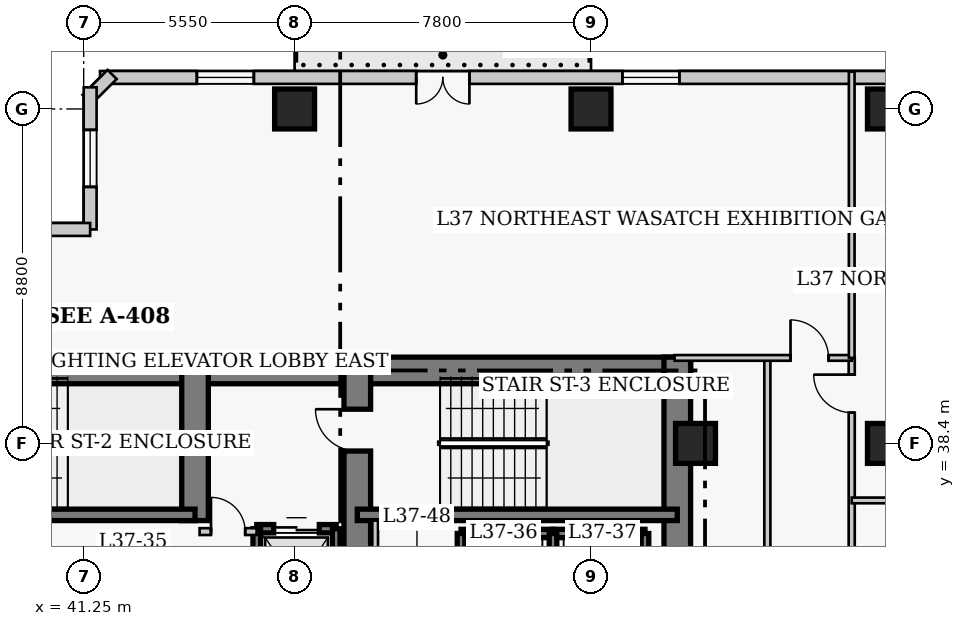
"""IFC4 building model, lengths in metres.
Left out: names, types, materials, properties, quantities, classifications, styles, units other than length and angle.
Written with IfcOpenShell. Run it as: python <this file> out.ifc"""

import sys

from ifc_helpers import new_model, si_unit, direction, frame, frame_2d, origin, origin_2d, place, context, subcontext, project, spatial, rectangle, extrude, element, fill, save


model = new_model("IFC4")
c1 = context("Model", 3, precision=1e-05, world=origin(), true_north=direction((0.0, 1.0)))
c2 = subcontext(c1, "Body", "Model", "MODEL_VIEW")
j1 = project(units=[si_unit("LENGTHUNIT", "METRE"), si_unit("PLANEANGLEUNIT", "RADIAN")], contexts=[c1])
p1 = place(None, origin())
s1 = spatial("IfcSite", under=j1, at=p1, CompositionType="ELEMENT")
p2 = place(p1, origin())
s2 = spatial("IfcBuilding", under=s1, at=p2, CompositionType="ELEMENT")
p3 = place(p2, frame((0.0, 0.0, 149.8)))
s3 = spatial("IfcBuildingStorey", under=s2, at=p3, CompositionType="ELEMENT", Elevation=149.8)
p4 = place(p3, frame((35.85, 40.32, 0.0), z_axis=(0.0, 0.0, 1.0), x_axis=(1.0, 0.0, 0.0)))
e1 = element("IfcWall", 1, at=p4, inside=s3, PredefinedType="SHEAR", context=c2, shape_type="SweptSolid", body=[
    extrude(rectangle(XDim=12.6, YDim=0.7, at=frame_2d((6.3, 0.0))), origin(), (0.0, 0.0, 1.0), 3.8),
])
p5 = place(p3, frame((48.45, 40.32, 0.0), z_axis=(0.0, 0.0, 1.0), x_axis=(1.0, 0.0, 0.0)))
e2 = element("IfcWall", 2, at=p5, inside=s3, PredefinedType="SHEAR", context=c2, shape_type="SweptSolid", body=[
    extrude(rectangle(XDim=8.77, YDim=0.7, at=frame_2d((4.385, 0.0))), origin(), (0.0, 0.0, 1.0), 3.8),
])
p6 = place(p3, frame((56.87, 27.05, 0.0), z_axis=(0.0, 0.0, 1.0), x_axis=(0.0, 1.0, 0.0)))
e3 = element("IfcWall", 3, at=p6, inside=s3, PredefinedType="SHEAR", context=c2, shape_type="SweptSolid", body=[
    extrude(rectangle(XDim=13.62, YDim=0.7, at=frame_2d((6.81, 0.0))), origin(), (0.0, 0.0, 1.0), 3.8),
])
p7 = place(p3, frame((44.18, 36.37, 0.0), z_axis=(0.0, 0.0, 1.0), x_axis=(0.0, 1.0, 0.0)))
e4 = element("IfcWall", 4, at=p7, inside=s3, PredefinedType="SHEAR", context=c2, shape_type="SweptSolid", body=[
    extrude(rectangle(XDim=3.95, YDim=0.7, at=frame_2d((1.975, 0.0))), origin(), (0.0, 0.0, 1.0), 3.8),
])
p8 = place(p3, frame((48.45, 32.4, 0.0), z_axis=(0.0, 0.0, 1.0), x_axis=(0.0, 1.0, 0.0)))
e5 = element("IfcWall", 5, at=p8, inside=s3, PredefinedType="SHEAR", context=c2, shape_type="SweptSolid", body=[
    extrude(rectangle(XDim=7.92, YDim=0.7, at=frame_2d((3.96, 0.0))), origin(), (0.0, 0.0, 1.0), 3.8),
])
p9 = place(p8, frame((5.8, 0.0, 0.0)))
e6 = element("IfcOpeningElement", 6, at=p9, cuts=e5, PredefinedType="OPENING", context=c2, shape_type="SweptSolid", body=[
    extrude(rectangle(XDim=1.1, YDim=2.15, at=frame_2d((0.55, 1.075))), frame((0.0, 0.36, 0.0), z_axis=(0.0, -1.0, 0.0), x_axis=(1.0, 0.0, 0.0)), (0.0, 0.0, 1.0), 0.72),
])
p10 = place(p3, frame((35.85, 36.52, 0.0), z_axis=(0.0, 0.0, 1.0), x_axis=(1.0, 0.0, 0.0)))
e7 = element("IfcWall", 7, at=p10, inside=s3, PredefinedType="SHEAR", context=c2, shape_type="SweptSolid", body=[
    extrude(rectangle(XDim=8.33, YDim=0.3, at=frame_2d((4.165, 0.0))), origin(), (0.0, 0.0, 1.0), 3.8),
])
p11 = place(p3, frame((48.45, 36.52, 0.0), z_axis=(0.0, 0.0, 1.0), x_axis=(1.0, 0.0, 0.0)))
e8 = element("IfcWall", 8, at=p11, inside=s3, PredefinedType="SHEAR", context=c2, shape_type="SweptSolid", body=[
    extrude(rectangle(XDim=8.42, YDim=0.3, at=frame_2d((4.21, 0.0))), origin(), (0.0, 0.0, 1.0), 3.8),
])
for number, where, z_axis, x_axis in (
    (9, (46.8, 47.2, 0.0), (0.0, 0.0, 1.0), (1.0, 0.0, 0.0)),
    (10, (54.6, 47.2, 0.0), (0.0, 0.0, 1.0), (1.0, 0.0, 0.0)),
    (11, (62.4, 38.4, 0.0), (0.0, 0.0, 1.0), (1.0, 0.0, 0.0)),
    (12, (62.4, 47.2, 0.0), (0.0, 0.0, 1.0), (1.0, 0.0, 0.0)),
    (13, (57.35, 38.4, 0.0), (0.0, 0.0, 1.0), (1.0, 0.0, 0.0)),
):
    element("IfcColumn", number, at=place(p3, frame(where, z_axis=z_axis, x_axis=x_axis)), inside=s3, PredefinedType="COLUMN", context=c2, shape_type="SweptSolid", body=[
        extrude(rectangle(XDim=1.05, YDim=1.05, at=origin_2d()), origin(), (0.0, 0.0, 1.0), 3.8),
    ])
p12 = place(p3, frame((68.37, 48.03, 0.0), z_axis=(0.0, 0.0, 1.0), x_axis=(-1.0, 0.0, 0.0)))
e14 = element("IfcWall", 14, at=p12, inside=s3, PredefinedType="SOLIDWALL", context=c2, shape_type="SweptSolid", body=[
    extrude(rectangle(XDim=26.69, YDim=0.34, at=frame_2d((13.345, 0.0))), origin(), (0.0, 0.0, 1.0), 3.55),
])
p13 = place(p12, frame((16.97, 0.0, 0.0)))
e15 = element("IfcOpeningElement", 15, at=p13, cuts=e14, PredefinedType="OPENING", context=c2, shape_type="SweptSolid", body=[
    extrude(rectangle(XDim=1.4, YDim=2.15, at=frame_2d((0.7, 1.075))), frame((0.0, 0.18, 0.0), z_axis=(0.0, -1.0, 0.0), x_axis=(1.0, 0.0, 0.0)), (0.0, 0.0, 1.0), 0.36),
])
p14 = place(p12, frame((3.048, 0.0, 0.85)))
e16 = element("IfcOpeningElement", 16, at=p14, cuts=e14, PredefinedType="OPENING", context=c2, shape_type="SweptSolid", body=[
    extrude(rectangle(XDim=1.5, YDim=1.75, at=frame_2d((0.75, 0.875))), frame((0.0, 0.18, 0.0), z_axis=(0.0, -1.0, 0.0), x_axis=(1.0, 0.0, 0.0)), (0.0, 0.0, 1.0), 0.36),
])
p15 = place(p12, frame((11.445, 0.0, 0.85)))
e17 = element("IfcOpeningElement", 17, at=p15, cuts=e14, PredefinedType="OPENING", context=c2, shape_type="SweptSolid", body=[
    extrude(rectangle(XDim=1.5, YDim=1.75, at=frame_2d((0.75, 0.875))), frame((0.0, 0.18, 0.0), z_axis=(0.0, -1.0, 0.0), x_axis=(1.0, 0.0, 0.0)), (0.0, 0.0, 1.0), 0.36),
])
p16 = place(p12, frame((22.642, 0.0, 0.85)))
e18 = element("IfcOpeningElement", 18, at=p16, cuts=e14, PredefinedType="OPENING", context=c2, shape_type="SweptSolid", body=[
    extrude(rectangle(XDim=1.5, YDim=1.75, at=frame_2d((0.75, 0.875))), frame((0.0, 0.18, 0.0), z_axis=(0.0, -1.0, 0.0), x_axis=(1.0, 0.0, 0.0)), (0.0, 0.0, 1.0), 0.36),
])
p17 = place(p3, frame((41.999, 48.108, 0.0), z_axis=(0.0, 0.0, 1.0), x_axis=(-0.707106781187, -0.707106781187, 0.0)))
e19 = element("IfcWall", 19, at=p17, inside=s3, PredefinedType="SOLIDWALL", context=c2, shape_type="SweptSolid", body=[
    extrude(rectangle(XDim=0.929, YDim=0.34, at=frame_2d((0.464, 0.0))), origin(), (0.0, 0.0, 1.0), 3.55),
])
p18 = place(p3, frame((41.42, 47.77, 0.0), z_axis=(0.0, 0.0, 1.0), x_axis=(0.0, -1.0, 0.0)))
e20 = element("IfcWall", 20, at=p18, inside=s3, PredefinedType="SOLIDWALL", context=c2, shape_type="SweptSolid", body=[
    extrude(rectangle(XDim=3.74, YDim=0.34, at=frame_2d((1.87, 0.0))), origin(), (0.0, 0.0, 1.0), 3.55),
])
p19 = place(p18, frame((1.12, 0.0, 0.85)))
e21 = element("IfcOpeningElement", 21, at=p19, cuts=e20, PredefinedType="OPENING", context=c2, shape_type="SweptSolid", body=[
    extrude(rectangle(XDim=1.5, YDim=1.75, at=frame_2d((0.75, 0.875))), frame((0.0, 0.18, 0.0), z_axis=(0.0, -1.0, 0.0), x_axis=(1.0, 0.0, 0.0)), (0.0, 0.0, 1.0), 0.36),
])
p20 = place(p3, frame((41.42, 44.03, 0.0), z_axis=(0.0, 0.0, 1.0), x_axis=(-1.0, 0.0, 0.0)))
e22 = element("IfcWall", 22, at=p20, inside=s3, PredefinedType="SOLIDWALL", context=c2, shape_type="SweptSolid", body=[
    extrude(rectangle(XDim=4.84, YDim=0.34, at=frame_2d((2.42, 0.0))), origin(), (0.0, 0.0, 1.0), 3.55),
])
p21 = place(p20, frame((1.67, 0.0, 0.85)))
e23 = element("IfcOpeningElement", 23, at=p21, cuts=e22, PredefinedType="OPENING", context=c2, shape_type="SweptSolid", body=[
    extrude(rectangle(XDim=1.5, YDim=1.75, at=frame_2d((0.75, 0.875))), frame((0.0, 0.18, 0.0), z_axis=(0.0, -1.0, 0.0), x_axis=(1.0, 0.0, 0.0)), (0.0, 0.0, 1.0), 0.36),
])
p22 = place(p3, frame((51.18, 36.03, 0.0), z_axis=(0.0, 0.0, 1.0), x_axis=(1.0, 0.0, 0.0)))
e24 = element("IfcWall", 24, at=p22, inside=s3, PredefinedType="SHEAR", context=c2, shape_type="SweptSolid", body=[
    extrude(rectangle(XDim=2.42, YDim=0.22, at=frame_2d((1.21, 0.0))), origin(), (0.0, 0.0, 1.0), 3.8),
])
p23 = place(p3, frame((51.18, 33.17, 0.0), z_axis=(0.0, 0.0, 1.0), x_axis=(0.0, 1.0, 0.0)))
e25 = element("IfcWall", 25, at=p23, inside=s3, PredefinedType="SHEAR", context=c2, shape_type="SweptSolid", body=[
    extrude(rectangle(XDim=2.86, YDim=0.2, at=frame_2d((1.43, 0.0))), origin(), (0.0, 0.0, 1.0), 3.8),
])
p24 = place(p3, frame((53.6, 36.03, 0.0), z_axis=(0.0, 0.0, 1.0), x_axis=(1.0, 0.0, 0.0)))
e26 = element("IfcWall", 26, at=p24, inside=s3, PredefinedType="SHEAR", context=c2, shape_type="SweptSolid", body=[
    extrude(rectangle(XDim=2.42, YDim=0.22, at=frame_2d((1.21, 0.0))), origin(), (0.0, 0.0, 1.0), 3.8),
])
for number, where, z_axis, x_axis in (
    (27, (53.6, 33.17, 0.0), (0.0, 0.0, 1.0), (0.0, 1.0, 0.0)),
    (28, (56.02, 33.17, 0.0), (0.0, 0.0, 1.0), (0.0, 1.0, 0.0)),
):
    element("IfcWall", number, at=place(p3, frame(where, z_axis=z_axis, x_axis=x_axis)), inside=s3, PredefinedType="SHEAR", context=c2, shape_type="SweptSolid", body=[
        extrude(rectangle(XDim=2.86, YDim=0.2, at=frame_2d((1.43, 0.0))), origin(), (0.0, 0.0, 1.0), 3.8),
    ])
p25 = place(p3, frame((45.805, 36.155, 0.0), z_axis=(0.0, 0.0, 1.0), x_axis=(1.0, 0.0, 0.0)))
e29 = element("IfcWall", 29, at=p25, inside=s3, PredefinedType="SHEAR", context=c2, shape_type="SweptSolid", body=[
    extrude(rectangle(XDim=2.09, YDim=0.22, at=frame_2d((1.045, 0.0))), origin(), (0.0, 0.0, 1.0), 3.8),
])
p26 = place(p25, frame((0.445, 0.0, 0.0)))
e30 = element("IfcOpeningElement", 30, at=p26, cuts=e29, PredefinedType="OPENING", context=c2, shape_type="SweptSolid", body=[
    extrude(rectangle(XDim=1.2, YDim=2.15, at=frame_2d((0.6, 1.075))), frame((0.0, 0.12, 0.0), z_axis=(0.0, -1.0, 0.0), x_axis=(1.0, 0.0, 0.0)), (0.0, 0.0, 1.0), 0.24),
])
p27 = place(p3, frame((45.805, 32.65, 0.0), z_axis=(0.0, 0.0, 1.0), x_axis=(0.0, 1.0, 0.0)))
e31 = element("IfcWall", 31, at=p27, inside=s3, PredefinedType="SHEAR", context=c2, shape_type="SweptSolid", body=[
    extrude(rectangle(XDim=3.505, YDim=0.2, at=frame_2d((1.752, 0.0))), origin(), (0.0, 0.0, 1.0), 3.8),
])
p28 = place(p3, frame((47.895, 33.245, 0.0), z_axis=(0.0, 0.0, 1.0), x_axis=(0.0, 1.0, 0.0)))
e32 = element("IfcWall", 32, at=p28, inside=s3, PredefinedType="SHEAR", context=c2, shape_type="SweptSolid", body=[
    extrude(rectangle(XDim=2.91, YDim=0.2, at=frame_2d((1.455, 0.0))), origin(), (0.0, 0.0, 1.0), 3.8),
])
p29 = place(p3, frame((44.3, 36.08, 0.0), z_axis=(0.0, 0.0, 1.0), x_axis=(1.0, 0.0, 0.0)))
e33 = element("IfcWall", 33, at=p29, inside=s3, PredefinedType="PARTITIONING", context=c2, shape_type="SweptSolid", body=[
    extrude(rectangle(XDim=1.5, YDim=0.18, at=frame_2d((0.75, 0.0))), origin(), (0.0, 0.0, 1.0), 3.55),
])
p30 = place(p29, frame((0.3, 0.0, 0.0)))
e34 = element("IfcOpeningElement", 34, at=p30, cuts=e33, PredefinedType="OPENING", context=c2, shape_type="SweptSolid", body=[
    extrude(rectangle(XDim=0.9, YDim=2.15, at=frame_2d((0.45, 1.075))), frame((0.0, 0.1, 0.0), z_axis=(0.0, -1.0, 0.0), x_axis=(1.0, 0.0, 0.0)), (0.0, 0.0, 1.0), 0.2),
])
p31 = place(p3, frame((48.92, 32.75, 0.0), z_axis=(0.0, 0.0, 1.0), x_axis=(0.0, 1.0, 0.0)))
e35 = element("IfcWall", 35, at=p31, inside=s3, PredefinedType="PARTITIONING", context=c2, shape_type="SweptSolid", body=[
    extrude(rectangle(XDim=3.62, YDim=0.15, at=frame_2d((1.81, 0.0))), origin(), (0.0, 0.0, 1.0), 3.55),
])
p32 = place(p3, frame((61.46, 12.05, 0.0), z_axis=(0.0, 0.0, 1.0), x_axis=(0.0, 1.0, 0.0)))
e36 = element("IfcWall", 36, at=p32, inside=s3, PredefinedType="PARTITIONING", context=c2, shape_type="SweptSolid", body=[
    extrude(rectangle(XDim=28.6, YDim=0.16, at=frame_2d((14.3, 0.0))), origin(), (0.0, 0.0, 1.0), 3.55),
])
p33 = place(p32, frame((0.925, 0.0, 0.0)))
e37 = element("IfcOpeningElement", 37, at=p33, cuts=e36, PredefinedType="OPENING", context=c2, shape_type="SweptSolid", body=[
    extrude(rectangle(XDim=0.95, YDim=2.1, at=frame_2d((0.475, 1.05))), frame((0.0, 0.09, 0.0), z_axis=(0.0, -1.0, 0.0), x_axis=(1.0, 0.0, 0.0)), (0.0, 0.0, 1.0), 0.18),
])
p34 = place(p32, frame((20.325, 0.0, 0.0)))
e38 = element("IfcOpeningElement", 38, at=p34, cuts=e36, PredefinedType="OPENING", context=c2, shape_type="SweptSolid", body=[
    extrude(rectangle(XDim=0.95, YDim=2.1, at=frame_2d((0.475, 1.05))), frame((0.0, 0.09, 0.0), z_axis=(0.0, -1.0, 0.0), x_axis=(1.0, 0.0, 0.0)), (0.0, 0.0, 1.0), 0.18),
])
p35 = place(p32, frame((27.16, 0.0, 0.0)))
e39 = element("IfcOpeningElement", 39, at=p35, cuts=e36, PredefinedType="OPENING", context=c2, shape_type="SweptSolid", body=[
    extrude(rectangle(XDim=1.0, YDim=2.15, at=frame_2d((0.5, 1.075))), frame((0.0, 0.09, 0.0), z_axis=(0.0, -1.0, 0.0), x_axis=(1.0, 0.0, 0.0)), (0.0, 0.0, 1.0), 0.18),
])
p36 = place(p3, frame((59.24, 17.96, 0.0), z_axis=(0.0, 0.0, 1.0), x_axis=(0.0, 1.0, 0.0)))
e40 = element("IfcWall", 40, at=p36, inside=s3, PredefinedType="PARTITIONING", context=c2, shape_type="SweptSolid", body=[
    extrude(rectangle(XDim=22.69, YDim=0.16, at=frame_2d((11.345, 0.0))), origin(), (0.0, 0.0, 1.0), 3.55),
])
p37 = place(p3, frame((56.8, 40.65, 0.0), z_axis=(0.0, 0.0, 1.0), x_axis=(1.0, 0.0, 0.0)))
e41 = element("IfcWall", 41, at=p37, inside=s3, PredefinedType="PARTITIONING", context=c2, shape_type="SweptSolid", body=[
    extrude(rectangle(XDim=4.66, YDim=0.15, at=frame_2d((2.33, 0.0))), origin(), (0.0, 0.0, 1.0), 3.55),
])
p38 = place(p37, frame((3.05, 0.0, 0.0)))
e42 = element("IfcOpeningElement", 42, at=p38, cuts=e41, PredefinedType="OPENING", context=c2, shape_type="SweptSolid", body=[
    extrude(rectangle(XDim=1.0, YDim=2.15, at=frame_2d((0.5, 1.075))), frame((0.0, 0.085, 0.0), z_axis=(0.0, -1.0, 0.0), x_axis=(1.0, 0.0, 0.0)), (0.0, 0.0, 1.0), 0.17),
])
p39 = place(p3, frame((61.46, 40.65, 0.0), z_axis=(0.0, 0.0, 1.0), x_axis=(0.0, 1.0, 0.0)))
e43 = element("IfcWall", 43, at=p39, inside=s3, PredefinedType="PARTITIONING", context=c2, shape_type="SweptSolid", body=[
    extrude(rectangle(XDim=7.53, YDim=0.15, at=frame_2d((3.765, 0.0))), origin(), (0.0, 0.0, 1.0), 3.55),
])
p40 = place(p3, frame((61.46, 36.9, 0.0), z_axis=(0.0, 0.0, 1.0), x_axis=(1.0, 0.0, 0.0)))
e44 = element("IfcWall", 44, at=p40, inside=s3, PredefinedType="PARTITIONING", context=c2, shape_type="SweptSolid", body=[
    extrude(rectangle(XDim=3.64, YDim=0.15, at=frame_2d((1.82, 0.0))), origin(), (0.0, 0.0, 1.0), 3.55),
])
p41 = place(p13, origin())
e45 = element("IfcDoor", 45, at=p41, inside=s3, OperationType="DOUBLE_DOOR_SINGLE_SWING", PredefinedType="DOOR", context=c2, shape_type="SweptSolid", body=[
    extrude(rectangle(XDim=1.4, YDim=2.15, at=frame_2d((0.7, 1.075))), frame((0.0, 0.025, 0.0), z_axis=(0.0, -1.0, 0.0), x_axis=(1.0, 0.0, 0.0)), (0.0, 0.0, 1.0), 0.05),
])
fill(e15, e45)
p42 = place(p15, origin())
e46 = element("IfcWindow", 46, at=p42, inside=s3, PartitioningType="SINGLE_PANEL", PredefinedType="WINDOW", context=c2, shape_type="SweptSolid", body=[
    extrude(rectangle(XDim=1.5, YDim=1.75, at=frame_2d((0.75, 0.875))), frame((0.0, 0.03, 0.0), z_axis=(0.0, -1.0, 0.0), x_axis=(1.0, 0.0, 0.0)), (0.0, 0.0, 1.0), 0.06),
])
fill(e17, e46)
p43 = place(p16, origin())
e47 = element("IfcWindow", 47, at=p43, inside=s3, PartitioningType="SINGLE_PANEL", PredefinedType="WINDOW", context=c2, shape_type="SweptSolid", body=[
    extrude(rectangle(XDim=1.5, YDim=1.75, at=frame_2d((0.75, 0.875))), frame((0.0, 0.03, 0.0), z_axis=(0.0, -1.0, 0.0), x_axis=(1.0, 0.0, 0.0)), (0.0, 0.0, 1.0), 0.06),
])
fill(e18, e47)
p44 = place(p19, origin())
e48 = element("IfcWindow", 48, at=p44, inside=s3, PartitioningType="SINGLE_PANEL", PredefinedType="WINDOW", context=c2, shape_type="SweptSolid", body=[
    extrude(rectangle(XDim=1.5, YDim=1.75, at=frame_2d((0.75, 0.875))), frame((0.0, 0.03, 0.0), z_axis=(0.0, -1.0, 0.0), x_axis=(1.0, 0.0, 0.0)), (0.0, 0.0, 1.0), 0.06),
])
fill(e21, e48)
p45 = place(p26, origin())
e49 = element("IfcDoor", 49, at=p45, inside=s3, OperationType="DOUBLE_DOOR_SLIDING", PredefinedType="DOOR", context=c2, shape_type="SweptSolid", body=[
    extrude(rectangle(XDim=1.2, YDim=2.15, at=frame_2d((0.6, 1.075))), frame((0.0, 0.025, 0.0), z_axis=(0.0, -1.0, 0.0), x_axis=(1.0, 0.0, 0.0)), (0.0, 0.0, 1.0), 0.05),
])
fill(e30, e49)
p46 = place(p30, origin())
e50 = element("IfcDoor", 50, at=p46, inside=s3, OperationType="SINGLE_SWING_LEFT", PredefinedType="DOOR", context=c2, shape_type="SweptSolid", body=[
    extrude(rectangle(XDim=0.9, YDim=2.15, at=frame_2d((0.45, 1.075))), frame((0.0, 0.025, 0.0), z_axis=(0.0, -1.0, 0.0), x_axis=(1.0, 0.0, 0.0)), (0.0, 0.0, 1.0), 0.05),
])
fill(e34, e50)
p47 = place(p38, origin())
e51 = element("IfcDoor", 51, at=p47, inside=s3, OperationType="SINGLE_SWING_LEFT", PredefinedType="DOOR", context=c2, shape_type="SweptSolid", body=[
    extrude(rectangle(XDim=1.0, YDim=2.15, at=frame_2d((0.5, 1.075))), frame((0.0, 0.025, 0.0), z_axis=(0.0, -1.0, 0.0), x_axis=(1.0, 0.0, 0.0)), (0.0, 0.0, 1.0), 0.05),
])
fill(e42, e51)
p48 = place(p35, origin())
e52 = element("IfcDoor", 52, at=p48, inside=s3, OperationType="SINGLE_SWING_RIGHT", PredefinedType="DOOR", context=c2, shape_type="SweptSolid", body=[
    extrude(rectangle(XDim=1.0, YDim=2.15, at=frame_2d((0.5, 1.075))), frame((0.0, 0.025, 0.0), z_axis=(0.0, -1.0, 0.0), x_axis=(1.0, 0.0, 0.0)), (0.0, 0.0, 1.0), 0.05),
])
fill(e39, e52)
p49 = place(p9, origin())
e53 = element("IfcDoor", 53, at=p49, inside=s3, OperationType="SINGLE_SWING_RIGHT", PredefinedType="DOOR", context=c2, shape_type="SweptSolid", body=[
    extrude(rectangle(XDim=1.1, YDim=2.15, at=frame_2d((0.55, 1.075))), frame((0.0, 0.025, 0.0), z_axis=(0.0, -1.0, 0.0), x_axis=(1.0, 0.0, 0.0)), (0.0, 0.0, 1.0), 0.05),
])
fill(e6, e53)
save(model, sys.argv[1])
